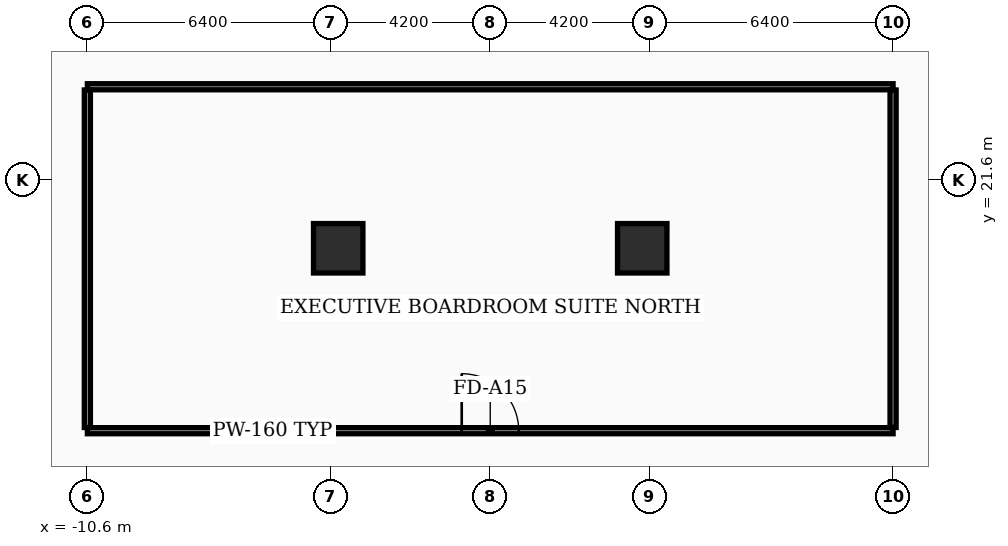
"""IFC4 building model, lengths in metres.
Left out: names, types, materials, properties, quantities, classifications, styles, units other than length and angle.
Written with IfcOpenShell. Run it as: python <this file> out.ifc"""

import sys

from ifc_helpers import new_model, si_unit, direction, frame, frame_2d, origin, origin_2d, place, context, subcontext, project, spatial, rectangle, extrude, element, fill, save


model = new_model("IFC4")
c1 = context("Model", 3, precision=1e-05, world=origin(), true_north=direction((0.0, 1.0)))
c2 = subcontext(c1, "Body", "Model", "MODEL_VIEW")
j1 = project(units=[si_unit("LENGTHUNIT", "METRE"), si_unit("PLANEANGLEUNIT", "RADIAN")], contexts=[c1])
p1 = place(None, origin())
s1 = spatial("IfcSite", under=j1, at=p1, CompositionType="ELEMENT")
p2 = place(p1, origin())
s2 = spatial("IfcBuilding", under=s1, at=p2, CompositionType="ELEMENT")
p3 = place(p2, frame((0.0, 0.0, 10.2)))
s3 = spatial("IfcBuildingStorey", under=s2, at=p3, CompositionType="ELEMENT", Elevation=10.2)
for number, where, z_axis, x_axis in (
    (1, (-4.0, 19.8, 0.0), (0.0, 0.0, 1.0), (1.0, 0.0, 0.0)),
    (2, (4.0, 19.8, 0.0), (0.0, 0.0, 1.0), (1.0, 0.0, 0.0)),
):
    element("IfcColumn", number, at=place(p3, frame(where, z_axis=z_axis, x_axis=x_axis)), inside=s3, PredefinedType="COLUMN", context=c2, shape_type="SweptSolid", body=[
        extrude(rectangle(XDim=1.3, YDim=1.3, at=origin_2d()), origin(), (0.0, 0.0, 1.0), 4.5),
    ])
p4 = place(p3, frame((-10.6, 15.0, 0.0), z_axis=(0.0, 0.0, 1.0), x_axis=(1.0, 0.0, 0.0)))
e3 = element("IfcWall", 3, at=p4, inside=s3, PredefinedType="PARTITIONING", context=c2, shape_type="SweptSolid", body=[
    extrude(rectangle(XDim=21.2, YDim=0.16, at=frame_2d((10.6, 0.0))), origin(), (0.0, 0.0, 1.0), 3.32),
])
p5 = place(p4, frame((9.85, 0.0, 0.0)))
e4 = element("IfcOpeningElement", 4, at=p5, cuts=e3, PredefinedType="OPENING", context=c2, shape_type="SweptSolid", body=[
    extrude(rectangle(XDim=1.5, YDim=2.15, at=frame_2d((0.75, 1.075))), frame((0.0, 0.09, 0.0), z_axis=(0.0, -1.0, 0.0), x_axis=(1.0, 0.0, 0.0)), (0.0, 0.0, 1.0), 0.18),
])
p6 = place(p3, frame((-10.6, 24.05, 0.0), z_axis=(0.0, 0.0, 1.0), x_axis=(1.0, 0.0, 0.0)))
e5 = element("IfcWall", 5, at=p6, inside=s3, PredefinedType="PARTITIONING", context=c2, shape_type="SweptSolid", body=[
    extrude(rectangle(XDim=21.2, YDim=0.16, at=frame_2d((10.6, 0.0))), origin(), (0.0, 0.0, 1.0), 3.32),
])
for number, where, z_axis, x_axis in (
    (6, (-10.6, 15.085, 0.0), (0.0, 0.0, 1.0), (0.0, 1.0, 0.0)),
    (7, (10.6, 15.085, 0.0), (0.0, 0.0, 1.0), (0.0, 1.0, 0.0)),
):
    element("IfcWall", number, at=place(p3, frame(where, z_axis=z_axis, x_axis=x_axis)), inside=s3, PredefinedType="PARTITIONING", context=c2, shape_type="SweptSolid", body=[
        extrude(rectangle(XDim=8.88, YDim=0.16, at=frame_2d((4.44, 0.0))), origin(), (0.0, 0.0, 1.0), 3.32),
    ])
p7 = place(p5, origin())
e8 = element("IfcDoor", 8, at=p7, inside=s3, OperationType="DOUBLE_DOOR_SINGLE_SWING", PredefinedType="DOOR", context=c2, shape_type="SweptSolid", body=[
    extrude(rectangle(XDim=1.5, YDim=2.15, at=frame_2d((0.75, 1.075))), frame((0.0, 0.025, 0.0), z_axis=(0.0, -1.0, 0.0), x_axis=(1.0, 0.0, 0.0)), (0.0, 0.0, 1.0), 0.05),
])
fill(e4, e8)
save(model, sys.argv[1])
